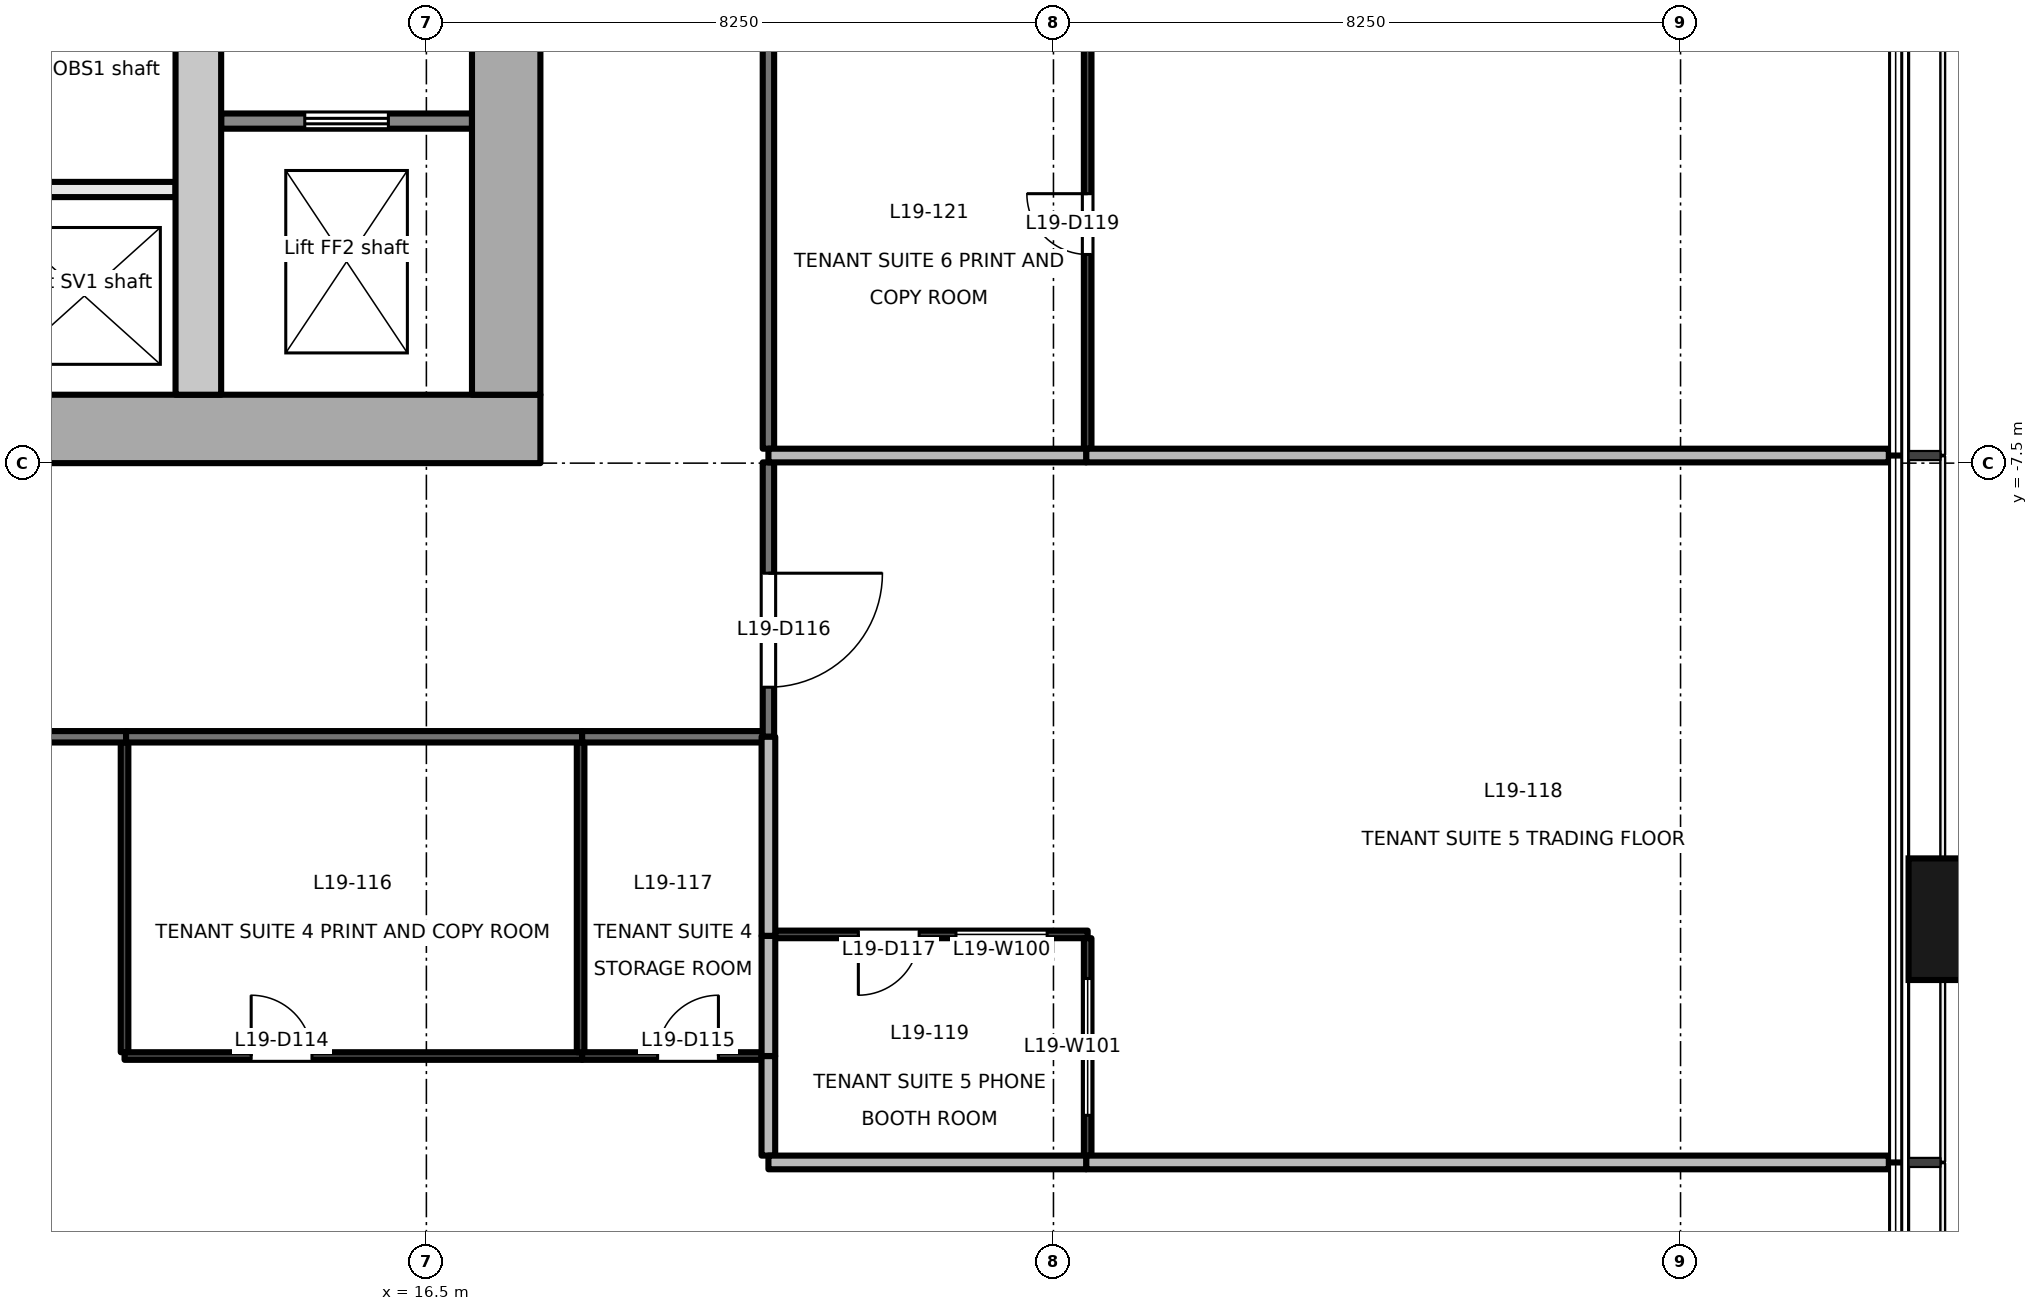
"""IFC4 building model, lengths in metres.
Left out: names, types, materials, properties, quantities, classifications, styles, units other than length and angle.
Written with IfcOpenShell. Run it as: python <this file> out.ifc"""

import sys

from ifc_helpers import new_model, si_unit, direction, frame, frame_2d, origin, origin_2d, place, context, subcontext, project, spatial, rectangle, extrude, element, fill, save


model = new_model("IFC4")
c1 = context("Model", 3, precision=1e-05, world=origin(), true_north=direction((0.0, 1.0)))
c2 = subcontext(c1, "Body", "Model", "MODEL_VIEW")
j1 = project(units=[si_unit("LENGTHUNIT", "METRE"), si_unit("PLANEANGLEUNIT", "RADIAN")], contexts=[c1])
p1 = place(None, origin())
s1 = spatial("IfcSite", under=j1, at=p1, CompositionType="ELEMENT")
p2 = place(p1, origin())
s2 = spatial("IfcBuilding", under=s1, at=p2, CompositionType="ELEMENT")
p3 = place(p2, frame((0.0, 0.0, 87.7)))
s3 = spatial("IfcBuildingStorey", under=s2, at=p3, CompositionType="ELEMENT", Elevation=87.7)
p4 = place(p3, frame((36.9, -13.5, -0.2), z_axis=(0.0, 0.0, 1.0), x_axis=(0.0, 1.0, 0.0)))
e1 = element("IfcColumn", 1, at=p4, inside=s3, PredefinedType="COLUMN", context=c2, shape_type="SweptSolid", body=[
    extrude(rectangle(XDim=1.6, YDim=1.8, at=origin_2d()), origin(), (0.0, 0.0, 1.0), 4.0),
])
p5 = place(p3, frame((-18.0, -7.05, -0.2), z_axis=(0.0, 0.0, 1.0), x_axis=(1.0, 0.0, 0.0)))
e2 = element("IfcWall", 2, at=p5, inside=s3, PredefinedType="SHEAR", context=c2, shape_type="SweptSolid", body=[
    extrude(rectangle(XDim=36.0, YDim=0.9, at=frame_2d((18.0, 0.0))), origin(), (0.0, 0.0, 1.0), 4.0),
])
p6 = place(p5, frame((7.8, 0.0, 0.2)))
e3 = element("IfcOpeningElement", 3, at=p6, cuts=e2, PredefinedType="OPENING", context=c2, shape_type="SweptSolid", body=[
    extrude(rectangle(XDim=2.4, YDim=2.1, at=frame_2d((1.2, 1.05))), frame((0.0, 0.46, 0.0), z_axis=(0.0, -1.0, 0.0), x_axis=(1.0, 0.0, 0.0)), (0.0, 0.0, 1.0), 0.921),
])
p7 = place(p5, frame((17.4, 0.0, 0.2)))
e4 = element("IfcOpeningElement", 4, at=p7, cuts=e2, PredefinedType="OPENING", context=c2, shape_type="SweptSolid", body=[
    extrude(rectangle(XDim=1.2, YDim=2.1, at=frame_2d((0.6, 1.05))), frame((0.0, 0.46, 0.0), z_axis=(0.0, -1.0, 0.0), x_axis=(1.0, 0.0, 0.0)), (0.0, 0.0, 1.0), 0.921),
])
p8 = place(p5, frame((26.1, 0.0, 0.2)))
e5 = element("IfcOpeningElement", 5, at=p8, cuts=e2, PredefinedType="OPENING", context=c2, shape_type="SweptSolid", body=[
    extrude(rectangle(XDim=2.4, YDim=2.1, at=frame_2d((1.2, 1.05))), frame((0.0, 0.46, 0.0), z_axis=(0.0, -1.0, 0.0), x_axis=(1.0, 0.0, 0.0)), (0.0, 0.0, 1.0), 0.921),
])
p9 = place(p3, frame((17.55, -6.6, -0.2), z_axis=(0.0, 0.0, 1.0), x_axis=(0.0, 1.0, 0.0)))
e6 = element("IfcWall", 6, at=p9, inside=s3, PredefinedType="SHEAR", context=c2, shape_type="SweptSolid", body=[
    extrude(rectangle(XDim=13.2, YDim=0.9, at=frame_2d((6.6, 0.0))), origin(), (0.0, 0.0, 1.0), 4.0),
])
p10 = place(p9, frame((4.55, 0.0, 0.2)))
e7 = element("IfcOpeningElement", 7, at=p10, cuts=e6, PredefinedType="OPENING", context=c2, shape_type="SweptSolid", body=[
    extrude(rectangle(XDim=1.2, YDim=2.1, at=frame_2d((0.6, 1.05))), frame((0.0, 0.46, 0.0), z_axis=(0.0, -1.0, 0.0), x_axis=(1.0, 0.0, 0.0)), (0.0, 0.0, 1.0), 0.921),
])
p11 = place(p3, frame((13.5, -6.6, -0.2), z_axis=(0.0, 0.0, 1.0), x_axis=(0.0, 1.0, 0.0)))
e8 = element("IfcWall", 8, at=p11, inside=s3, PredefinedType="SHEAR", context=c2, shape_type="SweptSolid", body=[
    extrude(rectangle(XDim=13.2, YDim=0.6, at=frame_2d((6.6, 0.0))), origin(), (0.0, 0.0, 1.0), 4.0),
])
p12 = place(p3, frame((13.8, -3.0, 0.0), z_axis=(0.0, 0.0, 1.0), x_axis=(1.0, 0.0, 0.0)))
e9 = element("IfcWall", 9, at=p12, inside=s3, PredefinedType="PARTITIONING", context=c2, shape_type="SweptSolid", body=[
    extrude(rectangle(XDim=3.3, YDim=0.2, at=frame_2d((1.65, 0.0))), origin(), (0.0, 0.0, 1.0), 3.8),
])
p13 = place(p12, frame((1.1, 0.0, 0.0)))
e10 = element("IfcOpeningElement", 10, at=p13, cuts=e9, PredefinedType="OPENING", context=c2, shape_type="SweptSolid", body=[
    extrude(rectangle(XDim=1.1, YDim=2.1, at=frame_2d((0.55, 1.05))), frame((0.0, 0.111, 0.0), z_axis=(0.0, -1.0, 0.0), x_axis=(1.0, 0.0, 0.0)), (0.0, 0.0, 1.0), 0.221),
])
p14 = place(p3, frame((10.9, -3.9, 0.0), z_axis=(0.0, 0.0, 1.0), x_axis=(1.0, 0.0, 0.0)))
e11 = element("IfcWall", 11, at=p14, inside=s3, PredefinedType="PARTITIONING", context=c2, shape_type="SweptSolid", body=[
    extrude(rectangle(XDim=2.3, YDim=0.2, at=frame_2d((1.15, 0.0))), origin(), (0.0, 0.0, 1.0), 3.8),
])
p15 = place(p3, frame((12.549, -11.1, 0.0), z_axis=(0.0, 0.0, 1.0), x_axis=(-1.0, 0.0, 0.0)))
e12 = element("IfcWall", 12, at=p15, inside=s3, PredefinedType="PARTITIONING", context=c2, shape_type="SweptSolid", body=[
    extrude(rectangle(XDim=6.04, YDim=0.15, at=frame_2d((3.02, 0.0))), origin(), (0.0, 0.0, 1.0), 2.8),
])
p16 = place(p15, frame((2.12, 0.0, 0.0)))
e13 = element("IfcOpeningElement", 13, at=p16, cuts=e12, PredefinedType="OPENING", context=c2, shape_type="SweptSolid", body=[
    extrude(rectangle(XDim=1.8, YDim=2.1, at=frame_2d((0.9, 1.05))), frame((0.0, 0.085, 0.0), z_axis=(0.0, -1.0, 0.0), x_axis=(1.0, 0.0, 0.0)), (0.0, 0.0, 1.0), 0.171),
])
p17 = place(p3, frame((18.549, -11.1, 0.0), z_axis=(0.0, 0.0, 1.0), x_axis=(-1.0, 0.0, 0.0)))
e14 = element("IfcWall", 14, at=p17, inside=s3, PredefinedType="PARTITIONING", context=c2, shape_type="SweptSolid", body=[
    extrude(rectangle(XDim=6.0, YDim=0.15, at=frame_2d((3.0, 0.0))), origin(), (0.0, 0.0, 1.0), 2.4),
])
p18 = place(p3, frame((20.925, -11.1, 0.0), z_axis=(0.0, 0.0, 1.0), x_axis=(-1.0, 0.0, 0.0)))
e15 = element("IfcWall", 15, at=p18, inside=s3, PredefinedType="PARTITIONING", context=c2, shape_type="SweptSolid", body=[
    extrude(rectangle(XDim=2.376, YDim=0.15, at=frame_2d((1.188, 0.0))), origin(), (0.0, 0.0, 1.0), 3.8),
])
p19 = place(p3, frame((21.0, -7.49, 0.0), z_axis=(0.0, 0.0, 1.0), x_axis=(0.0, -1.0, 0.0)))
e16 = element("IfcWall", 16, at=p19, inside=s3, PredefinedType="PARTITIONING", context=c2, shape_type="SweptSolid", body=[
    extrude(rectangle(XDim=3.61, YDim=0.15, at=frame_2d((1.805, 0.0))), origin(), (0.0, 0.0, 1.0), 2.9),
])
p20 = place(p19, frame((1.458, 0.0, 0.0)))
e17 = element("IfcOpeningElement", 17, at=p20, cuts=e16, PredefinedType="OPENING", context=c2, shape_type="SweptSolid", body=[
    extrude(rectangle(XDim=1.5, YDim=2.1, at=frame_2d((0.75, 1.05))), frame((0.0, 0.085, 0.0), z_axis=(0.0, -1.0, 0.0), x_axis=(1.0, 0.0, 0.0)), (0.0, 0.0, 1.0), 0.171),
])
p21 = place(p3, frame((21.0, -1.38, 0.0), z_axis=(0.0, 0.0, 1.0), x_axis=(0.0, -1.0, 0.0)))
e18 = element("IfcWall", 18, at=p21, inside=s3, PredefinedType="PARTITIONING", context=c2, shape_type="SweptSolid", body=[
    extrude(rectangle(XDim=5.93, YDim=0.15, at=frame_2d((2.965, 0.0))), origin(), (0.0, 0.0, 1.0), 2.9),
])
p22 = place(p3, frame((12.529, -11.175, 0.0), z_axis=(0.0, 0.0, 1.0), x_axis=(0.0, -1.0, 0.0)))
e19 = element("IfcWall", 19, at=p22, inside=s3, PredefinedType="PARTITIONING", context=c2, shape_type="SweptSolid", body=[
    extrude(rectangle(XDim=4.075, YDim=0.1, at=frame_2d((2.038, 0.0))), origin(), (0.0, 0.0, 1.0), 3.8),
])
p23 = place(p3, frame((12.529, -15.3, 0.0), z_axis=(0.0, 0.0, 1.0), x_axis=(1.0, 0.0, 0.0)))
e20 = element("IfcWall", 20, at=p23, inside=s3, PredefinedType="PARTITIONING", context=c2, shape_type="SweptSolid", body=[
    extrude(rectangle(XDim=6.02, YDim=0.1, at=frame_2d((3.01, 0.0))), origin(), (0.0, 0.0, 1.0), 2.4),
])
p24 = place(p23, frame((1.666, 0.0, 0.0)))
e21 = element("IfcOpeningElement", 21, at=p24, cuts=e20, PredefinedType="OPENING", context=c2, shape_type="SweptSolid", body=[
    extrude(rectangle(XDim=0.8, YDim=2.1, at=frame_2d((0.4, 1.05))), frame((0.0, 0.061, 0.0), z_axis=(0.0, -1.0, 0.0), x_axis=(1.0, 0.0, 0.0)), (0.0, 0.0, 1.0), 0.121),
])
p25 = place(p3, frame((18.549, -15.3, 0.0), z_axis=(0.0, 0.0, 1.0), x_axis=(1.0, 0.0, 0.0)))
e22 = element("IfcWall", 22, at=p25, inside=s3, PredefinedType="PARTITIONING", context=c2, shape_type="SweptSolid", body=[
    extrude(rectangle(XDim=2.361, YDim=0.1, at=frame_2d((1.18, 0.0))), origin(), (0.0, 0.0, 1.0), 3.8),
])
p26 = place(p25, frame((0.993, 0.0, 0.0)))
e23 = element("IfcOpeningElement", 23, at=p26, cuts=e22, PredefinedType="OPENING", context=c2, shape_type="SweptSolid", body=[
    extrude(rectangle(XDim=0.8, YDim=2.1, at=frame_2d((0.4, 1.05))), frame((0.0, 0.061, 0.0), z_axis=(0.0, -1.0, 0.0), x_axis=(1.0, 0.0, 0.0)), (0.0, 0.0, 1.0), 0.121),
])
p27 = place(p3, frame((25.18, -16.7, 0.0), z_axis=(0.0, 0.0, 1.0), x_axis=(1.0, 0.0, 0.0)))
e24 = element("IfcWall", 24, at=p27, inside=s3, PredefinedType="PARTITIONING", context=c2, shape_type="SweptSolid", body=[
    extrude(rectangle(XDim=10.56, YDim=0.18, at=frame_2d((5.28, 0.0))), origin(), (0.0, 0.0, 1.0), 3.8),
])
p28 = place(p3, frame((20.999, -15.3, 0.0), z_axis=(0.0, 0.0, 1.0), x_axis=(0.0, -1.0, 0.0)))
e25 = element("IfcWall", 25, at=p28, inside=s3, PredefinedType="PARTITIONING", context=c2, shape_type="SweptSolid", body=[
    extrude(rectangle(XDim=1.31, YDim=0.18, at=frame_2d((0.655, 0.0))), origin(), (0.0, 0.0, 1.0), 3.8),
])
p29 = place(p3, frame((21.0, -16.7, 0.0), z_axis=(0.0, 0.0, 1.0), x_axis=(1.0, 0.0, 0.0)))
e26 = element("IfcWall", 26, at=p29, inside=s3, PredefinedType="PARTITIONING", context=c2, shape_type="SweptSolid", body=[
    extrude(rectangle(XDim=4.18, YDim=0.18, at=frame_2d((2.09, 0.0))), origin(), (0.0, 0.0, 1.0), 3.8),
])
p30 = place(p3, frame((18.529, -11.175, 0.0), z_axis=(0.0, 0.0, 1.0), x_axis=(0.0, -1.0, 0.0)))
e27 = element("IfcWall", 27, at=p30, inside=s3, PredefinedType="PARTITIONING", context=c2, shape_type="SweptSolid", body=[
    extrude(rectangle(XDim=4.075, YDim=0.1, at=frame_2d((2.038, 0.0))), origin(), (0.0, 0.0, 1.0), 2.9),
])
p31 = place(p3, frame((21.0, -11.1, 0.0), z_axis=(0.0, 0.0, 1.0), x_axis=(0.0, -1.0, 0.0)))
e28 = element("IfcWall", 28, at=p31, inside=s3, PredefinedType="PARTITIONING", context=c2, shape_type="SweptSolid", body=[
    extrude(rectangle(XDim=2.62, YDim=0.18, at=frame_2d((1.31, 0.0))), origin(), (0.0, 0.0, 1.0), 2.9),
])
p32 = place(p3, frame((21.0, -13.72, 0.0), z_axis=(0.0, 0.0, 1.0), x_axis=(0.0, -1.0, 0.0)))
e29 = element("IfcWall", 29, at=p32, inside=s3, PredefinedType="PARTITIONING", context=c2, shape_type="SweptSolid", body=[
    extrude(rectangle(XDim=1.58, YDim=0.18, at=frame_2d((0.79, 0.0))), origin(), (0.0, 0.0, 1.0), 3.8),
])
p33 = place(p3, frame((25.2, -13.7, 0.0), z_axis=(0.0, 0.0, 1.0), x_axis=(-1.0, 0.0, 0.0)))
e30 = element("IfcWall", 30, at=p33, inside=s3, PredefinedType="PARTITIONING", context=c2, shape_type="SweptSolid", body=[
    extrude(rectangle(XDim=4.11, YDim=0.1, at=frame_2d((2.055, 0.0))), origin(), (0.0, 0.0, 1.0), 3.8),
])
p34 = place(p33, frame((2.217, 0.0, 0.0)))
e31 = element("IfcOpeningElement", 31, at=p34, cuts=e30, PredefinedType="OPENING", context=c2, shape_type="SweptSolid", body=[
    extrude(rectangle(XDim=0.8, YDim=2.1, at=frame_2d((0.4, 1.05))), frame((0.0, 0.061, 0.0), z_axis=(0.0, -1.0, 0.0), x_axis=(1.0, 0.0, 0.0)), (0.0, 0.0, 1.0), 0.121),
])
p35 = place(p33, frame((0.533, 0.0, 0.9)))
e32 = element("IfcOpeningElement", 32, at=p35, cuts=e30, PredefinedType="OPENING", context=c2, shape_type="SweptSolid", body=[
    extrude(rectangle(XDim=1.2, YDim=1.2, at=frame_2d((0.6, 0.6))), frame((0.0, 0.061, 0.0), z_axis=(0.0, -1.0, 0.0), x_axis=(1.0, 0.0, 0.0)), (0.0, 0.0, 1.0), 0.121),
])
p36 = place(p3, frame((25.2, -16.61, 0.0), z_axis=(0.0, 0.0, 1.0), x_axis=(0.0, 1.0, 0.0)))
e33 = element("IfcWall", 33, at=p36, inside=s3, PredefinedType="PARTITIONING", context=c2, shape_type="SweptSolid", body=[
    extrude(rectangle(XDim=2.86, YDim=0.1, at=frame_2d((1.43, 0.0))), origin(), (0.0, 0.0, 1.0), 3.8),
])
p37 = place(p36, frame((0.53, 0.0, 0.9)))
e34 = element("IfcOpeningElement", 34, at=p37, cuts=e33, PredefinedType="OPENING", context=c2, shape_type="SweptSolid", body=[
    extrude(rectangle(XDim=1.8, YDim=1.2, at=frame_2d((0.9, 0.6))), frame((0.0, 0.061, 0.0), z_axis=(0.0, -1.0, 0.0), x_axis=(1.0, 0.0, 0.0)), (0.0, 0.0, 1.0), 0.121),
])
p38 = place(p3, frame((25.18, -7.4, 0.0), z_axis=(0.0, 0.0, 1.0), x_axis=(1.0, 0.0, 0.0)))
e35 = element("IfcWall", 35, at=p38, inside=s3, PredefinedType="PARTITIONING", context=c2, shape_type="SweptSolid", body=[
    extrude(rectangle(XDim=10.56, YDim=0.18, at=frame_2d((5.28, 0.0))), origin(), (0.0, 0.0, 1.0), 3.8),
])
p39 = place(p3, frame((21.0, -7.4, 0.0), z_axis=(0.0, 0.0, 1.0), x_axis=(1.0, 0.0, 0.0)))
e36 = element("IfcWall", 36, at=p39, inside=s3, PredefinedType="PARTITIONING", context=c2, shape_type="SweptSolid", body=[
    extrude(rectangle(XDim=4.18, YDim=0.18, at=frame_2d((2.09, 0.0))), origin(), (0.0, 0.0, 1.0), 3.8),
])
p40 = place(p3, frame((25.2, -7.31, 0.0), z_axis=(0.0, 0.0, 1.0), x_axis=(0.0, 1.0, 0.0)))
e37 = element("IfcWall", 37, at=p40, inside=s3, PredefinedType="PARTITIONING", context=c2, shape_type="SweptSolid", body=[
    extrude(rectangle(XDim=5.91, YDim=0.1, at=frame_2d((2.955, 0.0))), origin(), (0.0, 0.0, 1.0), 2.9),
])
p41 = place(p40, frame((2.555, 0.0, 0.0)))
e38 = element("IfcOpeningElement", 38, at=p41, cuts=e37, PredefinedType="OPENING", context=c2, shape_type="SweptSolid", body=[
    extrude(rectangle(XDim=0.8, YDim=2.1, at=frame_2d((0.4, 1.05))), frame((0.0, 0.061, 0.0), z_axis=(0.0, -1.0, 0.0), x_axis=(1.0, 0.0, 0.0)), (0.0, 0.0, 1.0), 0.121),
])
p42 = place(p13, origin())
e39 = element("IfcDoor", 39, at=p42, inside=s3, OperationType="DOUBLE_DOOR_SLIDING", PredefinedType="DOOR", context=c2, shape_type="SweptSolid", body=[
    extrude(rectangle(XDim=1.1, YDim=2.1, at=frame_2d((0.55, 1.05))), frame((0.0, 0.025, 0.0), z_axis=(0.0, -1.0, 0.0), x_axis=(1.0, 0.0, 0.0)), (0.0, 0.0, 1.0), 0.05),
])
fill(e10, e39)
p43 = place(p24, origin())
e40 = element("IfcDoor", 40, at=p43, inside=s3, OperationType="SINGLE_SWING_LEFT", PredefinedType="DOOR", context=c2, shape_type="SweptSolid", body=[
    extrude(rectangle(XDim=0.8, YDim=2.1, at=frame_2d((0.4, 1.05))), frame((0.0, 0.025, 0.0), z_axis=(0.0, -1.0, 0.0), x_axis=(1.0, 0.0, 0.0)), (0.0, 0.0, 1.0), 0.05),
])
fill(e21, e40)
p44 = place(p26, origin())
e41 = element("IfcDoor", 41, at=p44, inside=s3, OperationType="SINGLE_SWING_RIGHT", PredefinedType="DOOR", context=c2, shape_type="SweptSolid", body=[
    extrude(rectangle(XDim=0.8, YDim=2.1, at=frame_2d((0.4, 1.05))), frame((0.0, 0.025, 0.0), z_axis=(0.0, -1.0, 0.0), x_axis=(1.0, 0.0, 0.0)), (0.0, 0.0, 1.0), 0.05),
])
fill(e23, e41)
p45 = place(p20, origin())
e42 = element("IfcDoor", 42, at=p45, inside=s3, OperationType="DOUBLE_DOOR_SINGLE_SWING", PredefinedType="DOOR", context=c2, shape_type="SweptSolid", body=[
    extrude(rectangle(XDim=1.5, YDim=2.1, at=frame_2d((0.75, 1.05))), frame((0.0, 0.025, 0.0), z_axis=(0.0, -1.0, 0.0), x_axis=(1.0, 0.0, 0.0)), (0.0, 0.0, 1.0), 0.05),
])
fill(e17, e42)
p46 = place(p34, origin())
e43 = element("IfcDoor", 43, at=p46, inside=s3, OperationType="SINGLE_SWING_RIGHT", PredefinedType="DOOR", context=c2, shape_type="SweptSolid", body=[
    extrude(rectangle(XDim=0.8, YDim=2.1, at=frame_2d((0.4, 1.05))), frame((0.0, 0.025, 0.0), z_axis=(0.0, -1.0, 0.0), x_axis=(1.0, 0.0, 0.0)), (0.0, 0.0, 1.0), 0.05),
])
fill(e31, e43)
p47 = place(p41, origin())
e44 = element("IfcDoor", 44, at=p47, inside=s3, OperationType="SINGLE_SWING_RIGHT", PredefinedType="DOOR", context=c2, shape_type="SweptSolid", body=[
    extrude(rectangle(XDim=0.8, YDim=2.1, at=frame_2d((0.4, 1.05))), frame((0.0, 0.025, 0.0), z_axis=(0.0, -1.0, 0.0), x_axis=(1.0, 0.0, 0.0)), (0.0, 0.0, 1.0), 0.05),
])
fill(e38, e44)
p48 = place(p35, origin())
e45 = element("IfcWindow", 45, at=p48, inside=s3, PartitioningType="SINGLE_PANEL", PredefinedType="WINDOW", context=c2, shape_type="SweptSolid", body=[
    extrude(rectangle(XDim=1.2, YDim=1.2, at=frame_2d((0.6, 0.6))), frame((0.0, 0.03, 0.0), z_axis=(0.0, -1.0, 0.0), x_axis=(1.0, 0.0, 0.0)), (0.0, 0.0, 1.0), 0.06),
])
fill(e32, e45)
p49 = place(p37, origin())
e46 = element("IfcWindow", 46, at=p49, inside=s3, PartitioningType="SINGLE_PANEL", PredefinedType="WINDOW", context=c2, shape_type="SweptSolid", body=[
    extrude(rectangle(XDim=1.8, YDim=1.2, at=frame_2d((0.9, 0.6))), frame((0.0, 0.03, 0.0), z_axis=(0.0, -1.0, 0.0), x_axis=(1.0, 0.0, 0.0)), (0.0, 0.0, 1.0), 0.06),
])
fill(e34, e46)
save(model, sys.argv[1])
